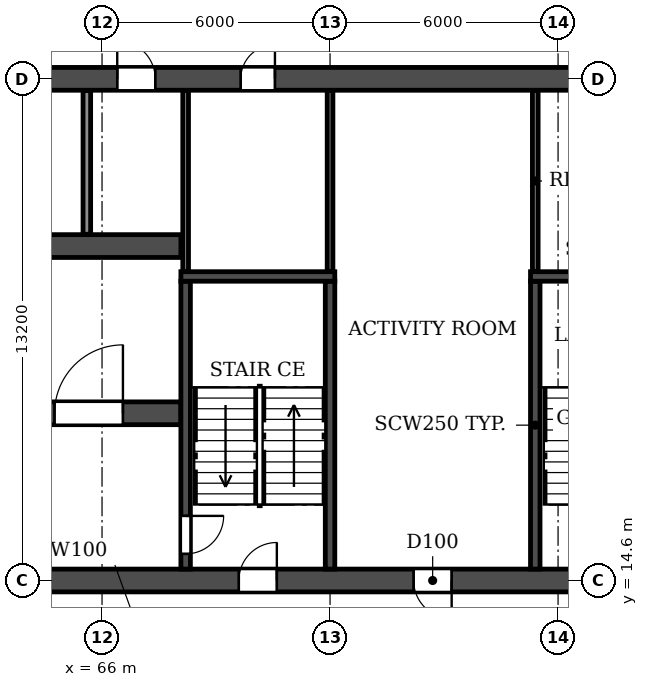
"""IFC4 building model, lengths in metres.
Left out: names, types, materials, properties, quantities, classifications, styles, units other than length and angle.
Written with IfcOpenShell. Run it as: python <this file> out.ifc"""

import sys

from ifc_helpers import new_model, si_unit, direction, frame, frame_2d, origin, place, context, subcontext, project, spatial, rectangle, extrude, element, fill, save


model = new_model("IFC4")
c1 = context("Model", 3, precision=1e-05, world=origin(), true_north=direction((0.0, 1.0)))
c2 = subcontext(c1, "Body", "Model", "MODEL_VIEW")
j1 = project(units=[si_unit("LENGTHUNIT", "METRE"), si_unit("PLANEANGLEUNIT", "RADIAN")], contexts=[c1])
p1 = place(None, origin())
s1 = spatial("IfcSite", under=j1, at=p1, CompositionType="ELEMENT")
p2 = place(p1, origin())
s2 = spatial("IfcBuilding", under=s1, at=p2, CompositionType="ELEMENT")
p3 = place(p2, frame((0.0, 0.0, 63.0)))
s3 = spatial("IfcBuildingStorey", under=s2, at=p3, CompositionType="ELEMENT", Elevation=63.0)
p4 = place(p3, frame((8.6, 14.6, 0.0), z_axis=(0.0, 0.0, 1.0), x_axis=(1.0, 0.0, 0.0)))
e1 = element("IfcWall", 1, at=p4, inside=s3, PredefinedType="SOLIDWALL", context=c2, shape_type="SweptSolid", body=[
    extrude(rectangle(XDim=84.8, YDim=0.6, at=frame_2d((42.4, 0.0))), origin(), (0.0, 0.0, 1.0), 2.95),
])
p5 = place(p4, frame((1.35, 0.0, 0.0)))
e2 = element("IfcOpeningElement", 2, at=p5, cuts=e1, PredefinedType="OPENING", context=c2, shape_type="SweptSolid", body=[
    extrude(rectangle(XDim=1.0, YDim=2.1, at=frame_2d((0.5, 1.05))), frame((0.0, 0.31, 0.0), z_axis=(0.0, -1.0, 0.0), x_axis=(1.0, 0.0, 0.0)), (0.0, 0.0, 1.0), 0.62),
])
p6 = place(p4, frame((6.05, 0.0, 0.0)))
e3 = element("IfcOpeningElement", 3, at=p6, cuts=e1, PredefinedType="OPENING", context=c2, shape_type="SweptSolid", body=[
    extrude(rectangle(XDim=1.0, YDim=2.1, at=frame_2d((0.5, 1.05))), frame((0.0, 0.31, 0.0), z_axis=(0.0, -1.0, 0.0), x_axis=(1.0, 0.0, 0.0)), (0.0, 0.0, 1.0), 0.62),
])
p7 = place(p4, frame((10.3, 0.0, 0.0)))
e4 = element("IfcOpeningElement", 4, at=p7, cuts=e1, PredefinedType="OPENING", context=c2, shape_type="SweptSolid", body=[
    extrude(rectangle(XDim=1.0, YDim=2.1, at=frame_2d((0.5, 1.05))), frame((0.0, 0.31, 0.0), z_axis=(0.0, -1.0, 0.0), x_axis=(1.0, 0.0, 0.0)), (0.0, 0.0, 1.0), 0.62),
])
p8 = place(p4, frame((18.2, 0.0, 0.0)))
e5 = element("IfcOpeningElement", 5, at=p8, cuts=e1, PredefinedType="OPENING", context=c2, shape_type="SweptSolid", body=[
    extrude(rectangle(XDim=1.0, YDim=2.1, at=frame_2d((0.5, 1.05))), frame((0.0, 0.31, 0.0), z_axis=(0.0, -1.0, 0.0), x_axis=(1.0, 0.0, 0.0)), (0.0, 0.0, 1.0), 0.62),
])
p9 = place(p4, frame((22.8, 0.0, 0.0)))
e6 = element("IfcOpeningElement", 6, at=p9, cuts=e1, PredefinedType="OPENING", context=c2, shape_type="SweptSolid", body=[
    extrude(rectangle(XDim=1.0, YDim=2.1, at=frame_2d((0.5, 1.05))), frame((0.0, 0.31, 0.0), z_axis=(0.0, -1.0, 0.0), x_axis=(1.0, 0.0, 0.0)), (0.0, 0.0, 1.0), 0.62),
])
p10 = place(p4, frame((35.4, 0.0, 0.0)))
e7 = element("IfcOpeningElement", 7, at=p10, cuts=e1, PredefinedType="OPENING", context=c2, shape_type="SweptSolid", body=[
    extrude(rectangle(XDim=1.0, YDim=2.1, at=frame_2d((0.5, 1.05))), frame((0.0, 0.31, 0.0), z_axis=(0.0, -1.0, 0.0), x_axis=(1.0, 0.0, 0.0)), (0.0, 0.0, 1.0), 0.62),
])
p11 = place(p4, frame((39.3, 0.0, 0.0)))
e8 = element("IfcOpeningElement", 8, at=p11, cuts=e1, PredefinedType="OPENING", context=c2, shape_type="SweptSolid", body=[
    extrude(rectangle(XDim=1.0, YDim=2.1, at=frame_2d((0.5, 1.05))), frame((0.0, 0.31, 0.0), z_axis=(0.0, -1.0, 0.0), x_axis=(1.0, 0.0, 0.0)), (0.0, 0.0, 1.0), 0.62),
])
p12 = place(p4, frame((41.9, 0.0, 0.0)))
e9 = element("IfcOpeningElement", 9, at=p12, cuts=e1, PredefinedType="OPENING", context=c2, shape_type="SweptSolid", body=[
    extrude(rectangle(XDim=1.0, YDim=2.1, at=frame_2d((0.5, 1.05))), frame((0.0, 0.31, 0.0), z_axis=(0.0, -1.0, 0.0), x_axis=(1.0, 0.0, 0.0)), (0.0, 0.0, 1.0), 0.62),
])
p13 = place(p4, frame((47.1, 0.0, 0.0)))
e10 = element("IfcOpeningElement", 10, at=p13, cuts=e1, PredefinedType="OPENING", context=c2, shape_type="SweptSolid", body=[
    extrude(rectangle(XDim=1.0, YDim=2.1, at=frame_2d((0.5, 1.05))), frame((0.0, 0.31, 0.0), z_axis=(0.0, -1.0, 0.0), x_axis=(1.0, 0.0, 0.0)), (0.0, 0.0, 1.0), 0.62),
])
p14 = place(p4, frame((61.0, 0.0, 0.0)))
e11 = element("IfcOpeningElement", 11, at=p14, cuts=e1, PredefinedType="OPENING", context=c2, shape_type="SweptSolid", body=[
    extrude(rectangle(XDim=1.0, YDim=2.1, at=frame_2d((0.5, 1.05))), frame((0.0, 0.31, 0.0), z_axis=(0.0, -1.0, 0.0), x_axis=(1.0, 0.0, 0.0)), (0.0, 0.0, 1.0), 0.62),
])
p15 = place(p4, frame((65.6, 0.0, 0.0)))
e12 = element("IfcOpeningElement", 12, at=p15, cuts=e1, PredefinedType="OPENING", context=c2, shape_type="SweptSolid", body=[
    extrude(rectangle(XDim=1.0, YDim=2.1, at=frame_2d((0.5, 1.05))), frame((0.0, 0.31, 0.0), z_axis=(0.0, -1.0, 0.0), x_axis=(1.0, 0.0, 0.0)), (0.0, 0.0, 1.0), 0.62),
])
p16 = place(p4, frame((73.5, 0.0, 0.0)))
e13 = element("IfcOpeningElement", 13, at=p16, cuts=e1, PredefinedType="OPENING", context=c2, shape_type="SweptSolid", body=[
    extrude(rectangle(XDim=1.0, YDim=2.1, at=frame_2d((0.5, 1.05))), frame((0.0, 0.31, 0.0), z_axis=(0.0, -1.0, 0.0), x_axis=(1.0, 0.0, 0.0)), (0.0, 0.0, 1.0), 0.62),
])
p17 = place(p4, frame((77.9, 0.0, 0.0)))
e14 = element("IfcOpeningElement", 14, at=p17, cuts=e1, PredefinedType="OPENING", context=c2, shape_type="SweptSolid", body=[
    extrude(rectangle(XDim=1.0, YDim=2.1, at=frame_2d((0.5, 1.05))), frame((0.0, 0.31, 0.0), z_axis=(0.0, -1.0, 0.0), x_axis=(1.0, 0.0, 0.0)), (0.0, 0.0, 1.0), 0.62),
])
p18 = place(p4, frame((82.6, 0.0, 0.0)))
e15 = element("IfcOpeningElement", 15, at=p18, cuts=e1, PredefinedType="OPENING", context=c2, shape_type="SweptSolid", body=[
    extrude(rectangle(XDim=1.0, YDim=2.1, at=frame_2d((0.5, 1.05))), frame((0.0, 0.31, 0.0), z_axis=(0.0, -1.0, 0.0), x_axis=(1.0, 0.0, 0.0)), (0.0, 0.0, 1.0), 0.62),
])
p19 = place(p3, frame((8.6, 27.8, 0.0), z_axis=(0.0, 0.0, 1.0), x_axis=(1.0, 0.0, 0.0)))
e16 = element("IfcWall", 16, at=p19, inside=s3, PredefinedType="SOLIDWALL", context=c2, shape_type="SweptSolid", body=[
    extrude(rectangle(XDim=84.8, YDim=0.6, at=frame_2d((42.4, 0.0))), origin(), (0.0, 0.0, 1.0), 2.95),
])
p20 = place(p19, frame((1.2, 0.0, 0.0)))
e17 = element("IfcOpeningElement", 17, at=p20, cuts=e16, PredefinedType="OPENING", context=c2, shape_type="SweptSolid", body=[
    extrude(rectangle(XDim=1.0, YDim=2.1, at=frame_2d((0.5, 1.05))), frame((0.0, 0.31, 0.0), z_axis=(0.0, -1.0, 0.0), x_axis=(1.0, 0.0, 0.0)), (0.0, 0.0, 1.0), 0.62),
])
p21 = place(p19, frame((5.9, 0.0, 0.0)))
e18 = element("IfcOpeningElement", 18, at=p21, cuts=e16, PredefinedType="OPENING", context=c2, shape_type="SweptSolid", body=[
    extrude(rectangle(XDim=1.0, YDim=2.1, at=frame_2d((0.5, 1.05))), frame((0.0, 0.31, 0.0), z_axis=(0.0, -1.0, 0.0), x_axis=(1.0, 0.0, 0.0)), (0.0, 0.0, 1.0), 0.62),
])
p22 = place(p19, frame((10.3, 0.0, 0.0)))
e19 = element("IfcOpeningElement", 19, at=p22, cuts=e16, PredefinedType="OPENING", context=c2, shape_type="SweptSolid", body=[
    extrude(rectangle(XDim=1.0, YDim=2.1, at=frame_2d((0.5, 1.05))), frame((0.0, 0.31, 0.0), z_axis=(0.0, -1.0, 0.0), x_axis=(1.0, 0.0, 0.0)), (0.0, 0.0, 1.0), 0.62),
])
p23 = place(p19, frame((13.65, 0.0, 0.0)))
e20 = element("IfcOpeningElement", 20, at=p23, cuts=e16, PredefinedType="OPENING", context=c2, shape_type="SweptSolid", body=[
    extrude(rectangle(XDim=0.9, YDim=2.1, at=frame_2d((0.45, 1.05))), frame((0.0, 0.31, 0.0), z_axis=(0.0, -1.0, 0.0), x_axis=(1.0, 0.0, 0.0)), (0.0, 0.0, 1.0), 0.62),
])
p24 = place(p19, frame((22.85, 0.0, 0.0)))
e21 = element("IfcOpeningElement", 21, at=p24, cuts=e16, PredefinedType="OPENING", context=c2, shape_type="SweptSolid", body=[
    extrude(rectangle(XDim=0.9, YDim=2.1, at=frame_2d((0.45, 1.05))), frame((0.0, 0.31, 0.0), z_axis=(0.0, -1.0, 0.0), x_axis=(1.0, 0.0, 0.0)), (0.0, 0.0, 1.0), 0.62),
])
p25 = place(p19, frame((27.3, 0.0, 0.0)))
e22 = element("IfcOpeningElement", 22, at=p25, cuts=e16, PredefinedType="OPENING", context=c2, shape_type="SweptSolid", body=[
    extrude(rectangle(XDim=1.0, YDim=2.1, at=frame_2d((0.5, 1.05))), frame((0.0, 0.31, 0.0), z_axis=(0.0, -1.0, 0.0), x_axis=(1.0, 0.0, 0.0)), (0.0, 0.0, 1.0), 0.62),
])
p26 = place(p19, frame((32.5, 0.0, 0.0)))
e23 = element("IfcOpeningElement", 23, at=p26, cuts=e16, PredefinedType="OPENING", context=c2, shape_type="SweptSolid", body=[
    extrude(rectangle(XDim=1.0, YDim=2.1, at=frame_2d((0.5, 1.05))), frame((0.0, 0.31, 0.0), z_axis=(0.0, -1.0, 0.0), x_axis=(1.0, 0.0, 0.0)), (0.0, 0.0, 1.0), 0.62),
])
p27 = place(p19, frame((39.0, 0.0, 0.0)))
e24 = element("IfcOpeningElement", 24, at=p27, cuts=e16, PredefinedType="OPENING", context=c2, shape_type="SweptSolid", body=[
    extrude(rectangle(XDim=1.0, YDim=2.1, at=frame_2d((0.5, 1.05))), frame((0.0, 0.31, 0.0), z_axis=(0.0, -1.0, 0.0), x_axis=(1.0, 0.0, 0.0)), (0.0, 0.0, 1.0), 0.62),
])
p28 = place(p19, frame((41.9, 0.0, 0.0)))
e25 = element("IfcOpeningElement", 25, at=p28, cuts=e16, PredefinedType="OPENING", context=c2, shape_type="SweptSolid", body=[
    extrude(rectangle(XDim=1.0, YDim=2.1, at=frame_2d((0.5, 1.05))), frame((0.0, 0.31, 0.0), z_axis=(0.0, -1.0, 0.0), x_axis=(1.0, 0.0, 0.0)), (0.0, 0.0, 1.0), 0.62),
])
p29 = place(p19, frame((47.4, 0.0, 0.0)))
e26 = element("IfcOpeningElement", 26, at=p29, cuts=e16, PredefinedType="OPENING", context=c2, shape_type="SweptSolid", body=[
    extrude(rectangle(XDim=1.0, YDim=2.1, at=frame_2d((0.5, 1.05))), frame((0.0, 0.31, 0.0), z_axis=(0.0, -1.0, 0.0), x_axis=(1.0, 0.0, 0.0)), (0.0, 0.0, 1.0), 0.62),
])
p30 = place(p19, frame((53.9, 0.0, 0.0)))
e27 = element("IfcOpeningElement", 27, at=p30, cuts=e16, PredefinedType="OPENING", context=c2, shape_type="SweptSolid", body=[
    extrude(rectangle(XDim=1.0, YDim=2.1, at=frame_2d((0.5, 1.05))), frame((0.0, 0.31, 0.0), z_axis=(0.0, -1.0, 0.0), x_axis=(1.0, 0.0, 0.0)), (0.0, 0.0, 1.0), 0.62),
])
p31 = place(p19, frame((57.8, 0.0, 0.0)))
e28 = element("IfcOpeningElement", 28, at=p31, cuts=e16, PredefinedType="OPENING", context=c2, shape_type="SweptSolid", body=[
    extrude(rectangle(XDim=1.0, YDim=2.1, at=frame_2d((0.5, 1.05))), frame((0.0, 0.31, 0.0), z_axis=(0.0, -1.0, 0.0), x_axis=(1.0, 0.0, 0.0)), (0.0, 0.0, 1.0), 0.62),
])
p32 = place(p19, frame((61.05, 0.0, 0.0)))
e29 = element("IfcOpeningElement", 29, at=p32, cuts=e16, PredefinedType="OPENING", context=c2, shape_type="SweptSolid", body=[
    extrude(rectangle(XDim=0.9, YDim=2.1, at=frame_2d((0.45, 1.05))), frame((0.0, 0.31, 0.0), z_axis=(0.0, -1.0, 0.0), x_axis=(1.0, 0.0, 0.0)), (0.0, 0.0, 1.0), 0.62),
])
p33 = place(p19, frame((70.25, 0.0, 0.0)))
e30 = element("IfcOpeningElement", 30, at=p33, cuts=e16, PredefinedType="OPENING", context=c2, shape_type="SweptSolid", body=[
    extrude(rectangle(XDim=0.9, YDim=2.1, at=frame_2d((0.45, 1.05))), frame((0.0, 0.31, 0.0), z_axis=(0.0, -1.0, 0.0), x_axis=(1.0, 0.0, 0.0)), (0.0, 0.0, 1.0), 0.62),
])
p34 = place(p19, frame((73.5, 0.0, 0.0)))
e31 = element("IfcOpeningElement", 31, at=p34, cuts=e16, PredefinedType="OPENING", context=c2, shape_type="SweptSolid", body=[
    extrude(rectangle(XDim=1.0, YDim=2.1, at=frame_2d((0.5, 1.05))), frame((0.0, 0.31, 0.0), z_axis=(0.0, -1.0, 0.0), x_axis=(1.0, 0.0, 0.0)), (0.0, 0.0, 1.0), 0.62),
])
p35 = place(p19, frame((77.75, 0.0, 0.0)))
e32 = element("IfcOpeningElement", 32, at=p35, cuts=e16, PredefinedType="OPENING", context=c2, shape_type="SweptSolid", body=[
    extrude(rectangle(XDim=1.0, YDim=2.1, at=frame_2d((0.5, 1.05))), frame((0.0, 0.31, 0.0), z_axis=(0.0, -1.0, 0.0), x_axis=(1.0, 0.0, 0.0)), (0.0, 0.0, 1.0), 0.62),
])
p36 = place(p19, frame((82.45, 0.0, 0.0)))
e33 = element("IfcOpeningElement", 33, at=p36, cuts=e16, PredefinedType="OPENING", context=c2, shape_type="SweptSolid", body=[
    extrude(rectangle(XDim=1.0, YDim=2.1, at=frame_2d((0.5, 1.05))), frame((0.0, 0.31, 0.0), z_axis=(0.0, -1.0, 0.0), x_axis=(1.0, 0.0, 0.0)), (0.0, 0.0, 1.0), 0.62),
])
p37 = place(p3, frame((33.925, 19.0, 0.0), z_axis=(0.0, 0.0, 1.0), x_axis=(1.0, 0.0, 0.0)))
e34 = element("IfcWall", 34, at=p37, inside=s3, PredefinedType="SOLIDWALL", context=c2, shape_type="SweptSolid", body=[
    extrude(rectangle(XDim=34.15, YDim=0.6, at=frame_2d((17.075, 0.0))), origin(), (0.0, 0.0, 1.0), 2.95),
])
p38 = place(p37, frame((16.175, 0.0, 0.0)))
e35 = element("IfcOpeningElement", 35, at=p38, cuts=e34, PredefinedType="OPENING", context=c2, shape_type="SweptSolid", body=[
    extrude(rectangle(XDim=1.8, YDim=2.1, at=frame_2d((0.9, 1.05))), frame((0.0, 0.31, 0.0), z_axis=(0.0, -1.0, 0.0), x_axis=(1.0, 0.0, 0.0)), (0.0, 0.0, 1.0), 0.62),
])
p39 = place(p37, frame((1.525, 0.0, 0.0)))
e36 = element("IfcOpeningElement", 36, at=p39, cuts=e34, PredefinedType="OPENING", context=c2, shape_type="SweptSolid", body=[
    extrude(rectangle(XDim=1.8, YDim=2.1, at=frame_2d((0.9, 1.05))), frame((0.0, 0.31, 0.0), z_axis=(0.0, -1.0, 0.0), x_axis=(1.0, 0.0, 0.0)), (0.0, 0.0, 1.0), 0.62),
])
p40 = place(p37, frame((8.725, 0.0, 0.0)))
e37 = element("IfcOpeningElement", 37, at=p40, cuts=e34, PredefinedType="OPENING", context=c2, shape_type="SweptSolid", body=[
    extrude(rectangle(XDim=1.1, YDim=2.1, at=frame_2d((0.55, 1.05))), frame((0.0, 0.31, 0.0), z_axis=(0.0, -1.0, 0.0), x_axis=(1.0, 0.0, 0.0)), (0.0, 0.0, 1.0), 0.62),
])
p41 = place(p37, frame((11.325, 0.0, 0.0)))
e38 = element("IfcOpeningElement", 38, at=p41, cuts=e34, PredefinedType="OPENING", context=c2, shape_type="SweptSolid", body=[
    extrude(rectangle(XDim=1.1, YDim=2.1, at=frame_2d((0.55, 1.05))), frame((0.0, 0.31, 0.0), z_axis=(0.0, -1.0, 0.0), x_axis=(1.0, 0.0, 0.0)), (0.0, 0.0, 1.0), 0.62),
])
p42 = place(p37, frame((13.925, 0.0, 0.0)))
e39 = element("IfcOpeningElement", 39, at=p42, cuts=e34, PredefinedType="OPENING", context=c2, shape_type="SweptSolid", body=[
    extrude(rectangle(XDim=1.1, YDim=2.1, at=frame_2d((0.55, 1.05))), frame((0.0, 0.31, 0.0), z_axis=(0.0, -1.0, 0.0), x_axis=(1.0, 0.0, 0.0)), (0.0, 0.0, 1.0), 0.62),
])
p43 = place(p37, frame((19.125, 0.0, 0.0)))
e40 = element("IfcOpeningElement", 40, at=p43, cuts=e34, PredefinedType="OPENING", context=c2, shape_type="SweptSolid", body=[
    extrude(rectangle(XDim=1.1, YDim=2.1, at=frame_2d((0.55, 1.05))), frame((0.0, 0.31, 0.0), z_axis=(0.0, -1.0, 0.0), x_axis=(1.0, 0.0, 0.0)), (0.0, 0.0, 1.0), 0.62),
])
p44 = place(p37, frame((21.725, 0.0, 0.0)))
e41 = element("IfcOpeningElement", 41, at=p44, cuts=e34, PredefinedType="OPENING", context=c2, shape_type="SweptSolid", body=[
    extrude(rectangle(XDim=1.1, YDim=2.1, at=frame_2d((0.55, 1.05))), frame((0.0, 0.31, 0.0), z_axis=(0.0, -1.0, 0.0), x_axis=(1.0, 0.0, 0.0)), (0.0, 0.0, 1.0), 0.62),
])
p45 = place(p37, frame((24.325, 0.0, 0.0)))
e42 = element("IfcOpeningElement", 42, at=p45, cuts=e34, PredefinedType="OPENING", context=c2, shape_type="SweptSolid", body=[
    extrude(rectangle(XDim=1.1, YDim=2.1, at=frame_2d((0.55, 1.05))), frame((0.0, 0.31, 0.0), z_axis=(0.0, -1.0, 0.0), x_axis=(1.0, 0.0, 0.0)), (0.0, 0.0, 1.0), 0.62),
])
p46 = place(p37, frame((30.825, 0.0, 0.0)))
e43 = element("IfcOpeningElement", 43, at=p46, cuts=e34, PredefinedType="OPENING", context=c2, shape_type="SweptSolid", body=[
    extrude(rectangle(XDim=1.8, YDim=2.1, at=frame_2d((0.9, 1.05))), frame((0.0, 0.31, 0.0), z_axis=(0.0, -1.0, 0.0), x_axis=(1.0, 0.0, 0.0)), (0.0, 0.0, 1.0), 0.62),
])
p47 = place(p3, frame((33.925, 23.4, 0.0), z_axis=(0.0, 0.0, 1.0), x_axis=(1.0, 0.0, 0.0)))
e44 = element("IfcWall", 44, at=p47, inside=s3, PredefinedType="SOLIDWALL", context=c2, shape_type="SweptSolid", body=[
    extrude(rectangle(XDim=34.15, YDim=0.6, at=frame_2d((17.075, 0.0))), origin(), (0.0, 0.0, 1.0), 2.95),
])
p48 = place(p47, frame((16.175, 0.0, 0.0)))
e45 = element("IfcOpeningElement", 45, at=p48, cuts=e44, PredefinedType="OPENING", context=c2, shape_type="SweptSolid", body=[
    extrude(rectangle(XDim=1.8, YDim=2.1, at=frame_2d((0.9, 1.05))), frame((0.0, 0.31, 0.0), z_axis=(0.0, -1.0, 0.0), x_axis=(1.0, 0.0, 0.0)), (0.0, 0.0, 1.0), 0.62),
])
p49 = place(p47, frame((11.025, 0.0, 0.0)))
e46 = element("IfcOpeningElement", 46, at=p49, cuts=e44, PredefinedType="OPENING", context=c2, shape_type="SweptSolid", body=[
    extrude(rectangle(XDim=1.1, YDim=2.1, at=frame_2d((0.55, 1.05))), frame((0.0, 0.31, 0.0), z_axis=(0.0, -1.0, 0.0), x_axis=(1.0, 0.0, 0.0)), (0.0, 0.0, 1.0), 0.62),
])
p50 = place(p3, frame((68.2, 14.9, 0.0), z_axis=(0.0, 0.0, 1.0), x_axis=(0.0, 1.0, 0.0)))
e47 = element("IfcWall", 47, at=p50, inside=s3, PredefinedType="SOLIDWALL", context=c2, shape_type="SweptSolid", body=[
    extrude(rectangle(XDim=7.575, YDim=0.25, at=frame_2d((3.788, 0.0))), origin(), (0.0, 0.0, 1.0), 2.95),
])
p51 = place(p50, frame((0.4, 0.0, 0.0)))
e48 = element("IfcOpeningElement", 48, at=p51, cuts=e47, PredefinedType="OPENING", context=c2, shape_type="SweptSolid", body=[
    extrude(rectangle(XDim=1.0, YDim=2.1, at=frame_2d((0.5, 1.05))), frame((0.0, 0.135, 0.0), z_axis=(0.0, -1.0, 0.0), x_axis=(1.0, 0.0, 0.0)), (0.0, 0.0, 1.0), 0.27),
])
p52 = place(p3, frame((72.0, 14.9, 0.0), z_axis=(0.0, 0.0, 1.0), x_axis=(0.0, 1.0, 0.0)))
e49 = element("IfcWall", 49, at=p52, inside=s3, PredefinedType="SOLIDWALL", context=c2, shape_type="SweptSolid", body=[
    extrude(rectangle(XDim=7.575, YDim=0.25, at=frame_2d((3.788, 0.0))), origin(), (0.0, 0.0, 1.0), 2.95),
])
p53 = place(p3, frame((68.075, 22.6, 0.0), z_axis=(0.0, 0.0, 1.0), x_axis=(1.0, 0.0, 0.0)))
e50 = element("IfcWall", 50, at=p53, inside=s3, PredefinedType="SOLIDWALL", context=c2, shape_type="SweptSolid", body=[
    extrude(rectangle(XDim=4.05, YDim=0.25, at=frame_2d((2.025, 0.0))), origin(), (0.0, 0.0, 1.0), 2.95),
])
p54 = place(p3, frame((77.4, 14.9, 0.0), z_axis=(0.0, 0.0, 1.0), x_axis=(0.0, 1.0, 0.0)))
e51 = element("IfcWall", 51, at=p54, inside=s3, PredefinedType="SOLIDWALL", context=c2, shape_type="SweptSolid", body=[
    extrude(rectangle(XDim=7.575, YDim=0.25, at=frame_2d((3.788, 0.0))), origin(), (0.0, 0.0, 1.0), 2.95),
])
p55 = place(p3, frame((77.275, 22.6, 0.0), z_axis=(0.0, 0.0, 1.0), x_axis=(1.0, 0.0, 0.0)))
e52 = element("IfcWall", 52, at=p55, inside=s3, PredefinedType="SOLIDWALL", context=c2, shape_type="SweptSolid", body=[
    extrude(rectangle(XDim=4.05, YDim=0.25, at=frame_2d((2.025, 0.0))), origin(), (0.0, 0.0, 1.0), 2.95),
])
p56 = place(p3, frame((65.6, 23.71, 0.0), z_axis=(0.0, 0.0, 1.0), x_axis=(0.0, 1.0, 0.0)))
e53 = element("IfcWall", 53, at=p56, inside=s3, PredefinedType="PARTITIONING", context=c2, shape_type="SweptSolid", body=[
    extrude(rectangle(XDim=3.78, YDim=0.2, at=frame_2d((1.89, 0.0))), origin(), (0.0, 0.0, 1.0), 2.95),
])
for number, where, z_axis, x_axis in (
    (54, (68.2, 22.735, 0.0), (0.0, 0.0, 1.0), (0.0, 1.0, 0.0)),
    (55, (72.0, 22.735, 0.0), (0.0, 0.0, 1.0), (0.0, 1.0, 0.0)),
    (56, (77.4, 22.735, 0.0), (0.0, 0.0, 1.0), (0.0, 1.0, 0.0)),
):
    element("IfcWall", number, at=place(p3, frame(where, z_axis=z_axis, x_axis=x_axis)), inside=s3, PredefinedType="PARTITIONING", context=c2, shape_type="SweptSolid", body=[
        extrude(rectangle(XDim=4.755, YDim=0.15, at=frame_2d((2.377, 0.0))), origin(), (0.0, 0.0, 1.0), 2.95),
    ])
p57 = place(p31, origin())
e57 = element("IfcDoor", 57, at=p57, inside=s3, OperationType="SINGLE_SWING_LEFT", PredefinedType="DOOR", context=c2, shape_type="SweptSolid", body=[
    extrude(rectangle(XDim=1.0, YDim=2.1, at=frame_2d((0.5, 1.05))), frame((0.0, 0.025, 0.0), z_axis=(0.0, -1.0, 0.0), x_axis=(1.0, 0.0, 0.0)), (0.0, 0.0, 1.0), 0.05),
])
fill(e28, e57)
p58 = place(p32, origin())
e58 = element("IfcDoor", 58, at=p58, inside=s3, OperationType="SINGLE_SWING_RIGHT", PredefinedType="DOOR", context=c2, shape_type="SweptSolid", body=[
    extrude(rectangle(XDim=0.9, YDim=2.1, at=frame_2d((0.45, 1.05))), frame((0.0, 0.025, 0.0), z_axis=(0.0, -1.0, 0.0), x_axis=(1.0, 0.0, 0.0)), (0.0, 0.0, 1.0), 0.05),
])
fill(e29, e58)
p59 = place(p14, origin())
e59 = element("IfcDoor", 59, at=p59, inside=s3, OperationType="SINGLE_SWING_RIGHT", PredefinedType="DOOR", context=c2, shape_type="SweptSolid", body=[
    extrude(rectangle(XDim=1.0, YDim=2.1, at=frame_2d((0.5, 1.05))), frame((0.0, 0.025, 0.0), z_axis=(0.0, -1.0, 0.0), x_axis=(1.0, 0.0, 0.0)), (0.0, 0.0, 1.0), 0.05),
])
fill(e11, e59)
p60 = place(p15, frame((1.0, 0.0, 0.0), z_axis=(0.0, 0.0, 1.0), x_axis=(-1.0, 0.0, 0.0)))
e60 = element("IfcDoor", 60, at=p60, inside=s3, OperationType="SINGLE_SWING_LEFT", PredefinedType="DOOR", context=c2, shape_type="SweptSolid", body=[
    extrude(rectangle(XDim=1.0, YDim=2.1, at=frame_2d((0.5, 1.05))), frame((0.0, 0.025, 0.0), z_axis=(0.0, -1.0, 0.0), x_axis=(1.0, 0.0, 0.0)), (0.0, 0.0, 1.0), 0.05),
])
fill(e12, e60)
p61 = place(p51, frame((1.0, 0.0, 0.0), z_axis=(0.0, 0.0, 1.0), x_axis=(-1.0, 0.0, 0.0)))
e61 = element("IfcDoor", 61, at=p61, inside=s3, OperationType="SINGLE_SWING_LEFT", PredefinedType="DOOR", context=c2, shape_type="SweptSolid", body=[
    extrude(rectangle(XDim=1.0, YDim=2.1, at=frame_2d((0.5, 1.05))), frame((0.0, 0.025, 0.0), z_axis=(0.0, -1.0, 0.0), x_axis=(1.0, 0.0, 0.0)), (0.0, 0.0, 1.0), 0.05),
])
fill(e48, e61)
p62 = place(p46, origin())
e62 = element("IfcDoor", 62, at=p62, inside=s3, OperationType="DOUBLE_DOOR_SINGLE_SWING", PredefinedType="DOOR", context=c2, shape_type="SweptSolid", body=[
    extrude(rectangle(XDim=1.8, YDim=2.1, at=frame_2d((0.9, 1.05))), frame((0.0, 0.025, 0.0), z_axis=(0.0, -1.0, 0.0), x_axis=(1.0, 0.0, 0.0)), (0.0, 0.0, 1.0), 0.05),
])
fill(e43, e62)
save(model, sys.argv[1])
